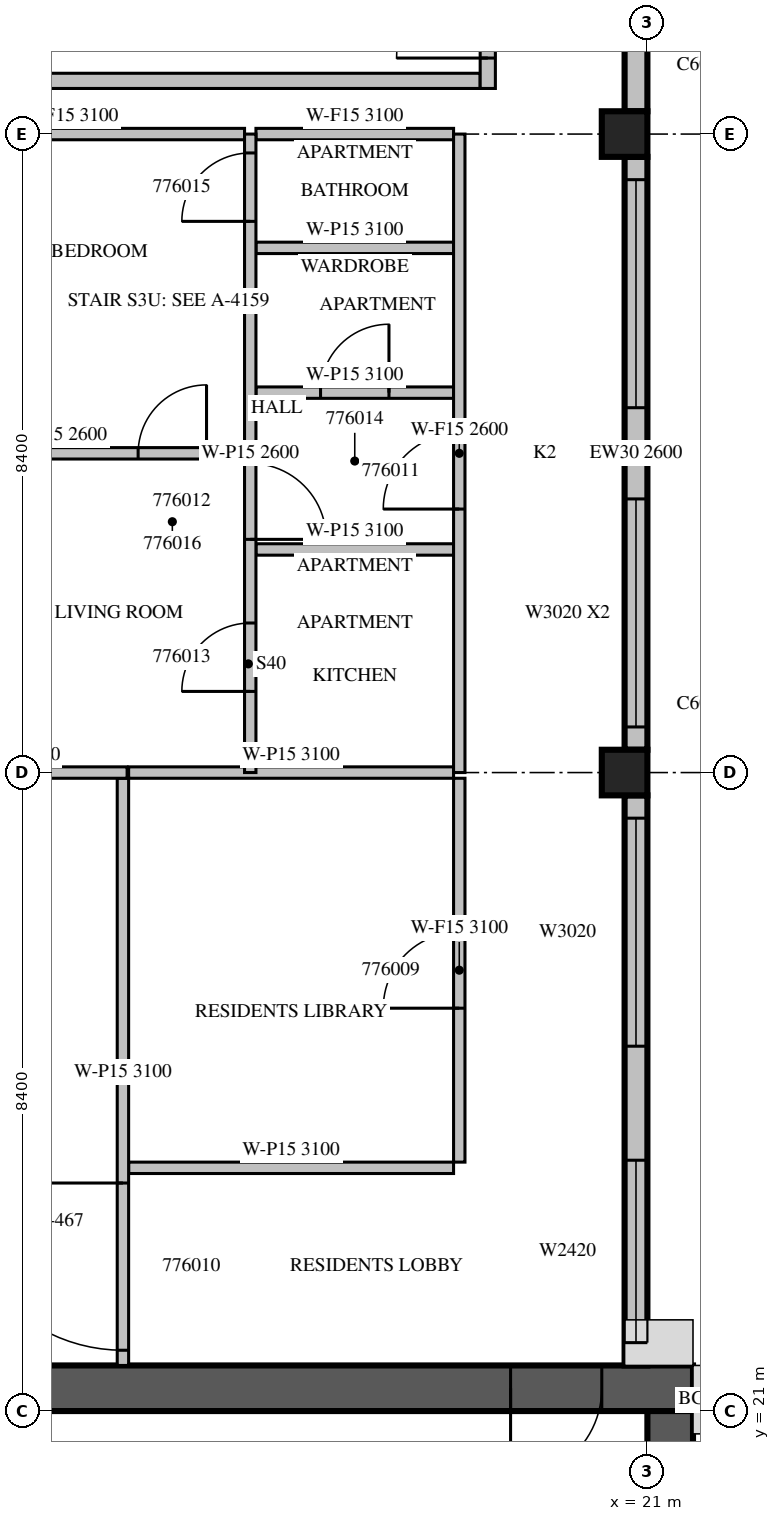
"""IFC4 building model, lengths in metres.
Left out: names, types, materials, properties, quantities, classifications, styles, units other than length and angle.
Written with IfcOpenShell. Run it as: python <this file> out.ifc"""

import sys

from ifc_helpers import new_model, si_unit, direction, frame, frame_2d, origin, origin_2d, place, context, subcontext, project, spatial, rectangle, extrude, source, transform, mapped, element, fill, save


model = new_model("IFC4")
c1 = context("Model", 3, precision=1e-05, world=origin(), true_north=direction((0.0, 1.0)))
c2 = subcontext(c1, "Body", "Model", "MODEL_VIEW")
j1 = project(units=[si_unit("LENGTHUNIT", "METRE"), si_unit("PLANEANGLEUNIT", "RADIAN")], contexts=[c1])
p1 = place(None, origin())
s1 = spatial("IfcSite", under=j1, at=p1, CompositionType="ELEMENT")
p2 = place(p1, origin())
s2 = spatial("IfcBuilding", under=s1, at=p2, CompositionType="ELEMENT")
p3 = place(p2, frame((0.0, 0.0, 326.5)))
s3 = spatial("IfcBuildingStorey", under=s2, at=p3, CompositionType="ELEMENT", Elevation=326.5)
m1 = source(origin(), c2, "Body", "SweptSolid", [
    extrude(rectangle(XDim=0.6, YDim=0.6, at=origin_2d()), origin(), (0.0, 0.0, 1.0), 3.5),
])
for number, where, z_axis, x_axis in (
    (1, (20.7, 29.4, 0.0), (0.0, 0.0, 1.0), (1.0, 0.0, 0.0)),
    (2, (20.7, 37.8, 0.0), (0.0, 0.0, 1.0), (1.0, 0.0, 0.0)),
):
    element("IfcColumn", number, at=place(p3, frame(where, z_axis=z_axis, x_axis=x_axis)), inside=s3, PredefinedType="COLUMN", context=c2, shape_type="MappedRepresentation", body=[
        mapped(m1, transform((0.0, 0.0, 0.0), scale=1.0)),
    ])
m2 = source(origin(), c2, "Body", "SweptSolid", [
    extrude(rectangle(XDim=11.1, YDim=0.6, at=frame_2d((5.55, 0.0))), origin(), (0.0, 0.0, 1.0), 3.5),
])
p4 = place(p3, frame((10.5, 21.3, 0.0), z_axis=(0.0, 0.0, 1.0), x_axis=(1.0, 0.0, 0.0)))
e3 = element("IfcWall", 3, at=p4, inside=s3, PredefinedType="SHEAR", context=c2, shape_type="MappedRepresentation", body=[
    mapped(m2, transform((0.0, 0.0, 0.0), scale=1.0)),
])
m3 = source(origin(), c2, "Body", "SweptSolid", [
    extrude(rectangle(XDim=1.2, YDim=2.1, at=frame_2d((0.6, 1.05))), frame((0.0, 0.31, 0.0), z_axis=(0.0, -1.0, 0.0), x_axis=(1.0, 0.0, 0.0)), (0.0, 0.0, 1.0), 0.62),
])
p5 = place(p4, frame((8.7, 0.0, 0.0)))
e4 = element("IfcOpeningElement", 4, at=p5, cuts=e3, PredefinedType="OPENING", context=c2, shape_type="MappedRepresentation", body=[
    mapped(m3, transform((0.0, 0.0, 0.0), scale=1.0)),
])
m4 = source(origin(), c2, "Body", "SweptSolid", [
    extrude(rectangle(XDim=10.5, YDim=0.6, at=frame_2d((5.25, 0.0))), origin(), (0.0, 0.0, 1.0), 3.5),
])
p6 = place(p3, frame((21.3, 10.5, 0.0), z_axis=(0.0, 0.0, 1.0), x_axis=(0.0, 1.0, 0.0)))
e5 = element("IfcWall", 5, at=p6, inside=s3, PredefinedType="SHEAR", context=c2, shape_type="MappedRepresentation", body=[
    mapped(m4, transform((0.0, 0.0, 0.0), scale=1.0)),
])
m5 = source(origin(), c2, "Body", "SweptSolid", [
    extrude(rectangle(XDim=1.2, YDim=2.4, at=frame_2d((0.6, 1.2))), frame((0.0, 0.31, 0.0), z_axis=(0.0, -1.0, 0.0), x_axis=(1.0, 0.0, 0.0)), (0.0, 0.0, 1.0), 0.62),
])
p7 = place(p6, frame((5.7, 0.0, 0.6)))
e6 = element("IfcOpeningElement", 6, at=p7, cuts=e5, PredefinedType="OPENING", context=c2, shape_type="MappedRepresentation", body=[
    mapped(m5, transform((0.0, 0.0, 0.0), scale=1.0)),
])
m6 = source(origin(), c2, "Body", "SweptSolid", [
    extrude(rectangle(XDim=7.5, YDim=0.3, at=frame_2d((3.75, 0.0))), origin(), (0.0, 0.0, 1.0), 3.1),
])
p8 = place(p3, frame((20.85, 21.6, 0.0), z_axis=(0.0, 0.0, 1.0), x_axis=(0.0, 1.0, 0.0)))
e7 = element("IfcWall", 7, at=p8, inside=s3, PredefinedType="STANDARD", context=c2, shape_type="MappedRepresentation", body=[
    mapped(m6, transform((0.0, 0.0, 0.0), scale=1.0)),
])
m7 = source(origin(), c2, "Body", "SweptSolid", [
    extrude(rectangle(XDim=2.4, YDim=2.0, at=frame_2d((1.2, 1.0))), frame((0.0, 0.16, 0.0), z_axis=(0.0, -1.0, 0.0), x_axis=(1.0, 0.0, 0.0)), (0.0, 0.0, 1.0), 0.32),
])
p9 = place(p8, frame((0.3, 0.0, 0.6)))
e8 = element("IfcOpeningElement", 8, at=p9, cuts=e7, PredefinedType="OPENING", context=c2, shape_type="MappedRepresentation", body=[
    mapped(m7, transform((0.0, 0.0, 0.0), scale=1.0)),
])
m8 = source(origin(), c2, "Body", "SweptSolid", [
    extrude(rectangle(XDim=3.0, YDim=2.0, at=frame_2d((1.5, 1.0))), frame((0.0, 0.16, 0.0), z_axis=(0.0, -1.0, 0.0), x_axis=(1.0, 0.0, 0.0)), (0.0, 0.0, 1.0), 0.32),
])
p10 = place(p8, frame((4.2, 0.0, 0.6)))
e9 = element("IfcOpeningElement", 9, at=p10, cuts=e7, PredefinedType="OPENING", context=c2, shape_type="MappedRepresentation", body=[
    mapped(m8, transform((0.0, 0.0, 0.0), scale=1.0)),
])
p11 = place(p3, frame((20.85, 29.7, 0.0), z_axis=(0.0, 0.0, 1.0), x_axis=(0.0, 1.0, 0.0)))
e10 = element("IfcWall", 10, at=p11, inside=s3, PredefinedType="STANDARD", context=c2, shape_type="SweptSolid", body=[
    extrude(rectangle(XDim=7.8, YDim=0.3, at=frame_2d((3.9, 0.0))), origin(), (0.0, 0.0, 1.0), 2.6),
])
p12 = place(p11, frame((0.3, 0.0, 0.6)))
e11 = element("IfcOpeningElement", 11, at=p12, cuts=e10, PredefinedType="OPENING", context=c2, shape_type="MappedRepresentation", body=[
    mapped(m8, transform((0.0, 0.0, 0.0), scale=1.0)),
])
p13 = place(p11, frame((4.5, 0.0, 0.6)))
e12 = element("IfcOpeningElement", 12, at=p13, cuts=e10, PredefinedType="OPENING", context=c2, shape_type="MappedRepresentation", body=[
    mapped(m8, transform((0.0, 0.0, 0.0), scale=1.0)),
])
p14 = place(p3, frame((20.85, 38.1, 0.0), z_axis=(0.0, 0.0, 1.0), x_axis=(0.0, 1.0, 0.0)))
e13 = element("IfcWall", 13, at=p14, inside=s3, PredefinedType="STANDARD", context=c2, shape_type="SweptSolid", body=[
    extrude(rectangle(XDim=5.58, YDim=0.3, at=frame_2d((2.79, 0.0))), origin(), (0.0, 0.0, 1.0), 3.1),
])
m9 = source(origin(), c2, "Body", "SweptSolid", [
    extrude(rectangle(XDim=3.6, YDim=2.0, at=frame_2d((1.8, 1.0))), frame((0.0, 0.16, 0.0), z_axis=(0.0, -1.0, 0.0), x_axis=(1.0, 0.0, 0.0)), (0.0, 0.0, 1.0), 0.32),
])
p15 = place(p14, frame((0.84, 0.0, 0.6)))
e14 = element("IfcOpeningElement", 14, at=p15, cuts=e13, PredefinedType="OPENING", context=c2, shape_type="MappedRepresentation", body=[
    mapped(m9, transform((0.0, 0.0, 0.0), scale=1.0)),
])
m10 = source(origin(), c2, "Body", "SweptSolid", [
    extrude(rectangle(XDim=8.0, YDim=0.2, at=frame_2d((4.0, 0.0))), origin(), (0.0, 0.0, 1.0), 3.1),
])
p16 = place(p3, frame((10.8, 38.5, 0.0), z_axis=(0.0, 0.0, 1.0), x_axis=(1.0, 0.0, 0.0)))
e15 = element("IfcWall", 15, at=p16, inside=s3, PredefinedType="PARTITIONING", context=c2, shape_type="MappedRepresentation", body=[
    mapped(m10, transform((0.0, 0.0, 0.0), scale=1.0)),
])
m11 = source(origin(), c2, "Body", "SweptSolid", [
    extrude(rectangle(XDim=5.45, YDim=0.2, at=frame_2d((2.725, 0.0))), origin(), (0.0, 0.0, 1.0), 3.1),
])
p17 = place(p3, frame((18.9, 38.4, 0.0), z_axis=(0.0, 0.0, 1.0), x_axis=(0.0, 1.0, 0.0)))
e16 = element("IfcWall", 16, at=p17, inside=s3, PredefinedType="PARTITIONING", context=c2, shape_type="MappedRepresentation", body=[
    mapped(m11, transform((0.0, 0.0, 0.0), scale=1.0)),
])
m12 = source(origin(), c2, "Body", "SweptSolid", [
    extrude(rectangle(XDim=1.2, YDim=2.1, at=frame_2d((0.6, 1.05))), frame((0.0, 0.11, 0.0), z_axis=(0.0, -1.0, 0.0), x_axis=(1.0, 0.0, 0.0)), (0.0, 0.0, 1.0), 0.22),
])
p18 = place(p17, frame((0.4, 0.0, 0.0)))
e17 = element("IfcOpeningElement", 17, at=p18, cuts=e16, PredefinedType="OPENING", context=c2, shape_type="MappedRepresentation", body=[
    mapped(m12, transform((0.0, 0.0, 0.0), scale=1.0)),
])
m13 = source(origin(), c2, "Body", "SweptSolid", [
    extrude(rectangle(XDim=0.9, YDim=2.1, at=frame_2d((0.45, 1.05))), frame((0.0, 0.11, 0.0), z_axis=(0.0, -1.0, 0.0), x_axis=(1.0, 0.0, 0.0)), (0.0, 0.0, 1.0), 0.22),
])
p19 = place(p17, frame((3.25, 0.0, 0.0)))
e18 = element("IfcOpeningElement", 18, at=p19, cuts=e16, PredefinedType="OPENING", context=c2, shape_type="MappedRepresentation", body=[
    mapped(m13, transform((0.0, 0.0, 0.0), scale=1.0)),
])
m14 = source(origin(), c2, "Body", "SweptSolid", [
    extrude(rectangle(XDim=4.275, YDim=0.15, at=frame_2d((2.138, 0.0))), origin(), (0.0, 0.0, 1.0), 3.1),
])
for number, where, z_axis, x_axis in (
    (19, (14.175, 24.2, 0.0), (0.0, 0.0, 1.0), (1.0, 0.0, 0.0)),
    (20, (18.45, 29.4, 0.0), (0.0, 0.0, 1.0), (-1.0, 0.0, 0.0)),
):
    element("IfcWall", number, at=place(p3, frame(where, z_axis=z_axis, x_axis=x_axis)), inside=s3, PredefinedType="PARTITIONING", context=c2, shape_type="MappedRepresentation", body=[
        mapped(m14, transform((0.0, 0.0, 0.0), scale=1.0)),
    ])
m15 = source(origin(), c2, "Body", "SweptSolid", [
    extrude(rectangle(XDim=5.05, YDim=0.15, at=frame_2d((2.525, 0.0))), origin(), (0.0, 0.0, 1.0), 3.1),
])
p20 = place(p3, frame((18.525, 24.275, 0.0), z_axis=(0.0, 0.0, 1.0), x_axis=(0.0, 1.0, 0.0)))
e21 = element("IfcWall", 21, at=p20, inside=s3, PredefinedType="PARTITIONING", context=c2, shape_type="MappedRepresentation", body=[
    mapped(m15, transform((0.0, 0.0, 0.0), scale=1.0)),
])
m16 = source(origin(), c2, "Body", "SweptSolid", [
    extrude(rectangle(XDim=1.0, YDim=2.1, at=frame_2d((0.5, 1.05))), frame((0.0, 0.085, 0.0), z_axis=(0.0, -1.0, 0.0), x_axis=(1.0, 0.0, 0.0)), (0.0, 0.0, 1.0), 0.17),
])
p21 = place(p20, frame((2.025, 0.0, 0.0)))
e22 = element("IfcOpeningElement", 22, at=p21, cuts=e21, PredefinedType="OPENING", context=c2, shape_type="MappedRepresentation", body=[
    mapped(m16, transform((0.0, 0.0, 0.0), scale=1.0)),
])
m17 = source(origin(), c2, "Body", "SweptSolid", [
    extrude(rectangle(XDim=7.725, YDim=0.15, at=frame_2d((3.862, 0.0))), origin(), (0.0, 0.0, 1.0), 3.1),
])
p22 = place(p3, frame((14.1, 29.325, 0.0), z_axis=(0.0, 0.0, 1.0), x_axis=(0.0, -1.0, 0.0)))
e23 = element("IfcWall", 23, at=p22, inside=s3, PredefinedType="PARTITIONING", context=c2, shape_type="MappedRepresentation", body=[
    mapped(m17, transform((0.0, 0.0, 0.0), scale=1.0)),
])
m18 = source(origin(), c2, "Body", "SweptSolid", [
    extrude(rectangle(XDim=2.2, YDim=2.1, at=frame_2d((1.1, 1.05))), frame((0.0, 0.085, 0.0), z_axis=(0.0, -1.0, 0.0), x_axis=(1.0, 0.0, 0.0)), (0.0, 0.0, 1.0), 0.17),
])
p23 = place(p22, frame((5.325, 0.0, 0.0)))
e24 = element("IfcOpeningElement", 24, at=p23, cuts=e23, PredefinedType="OPENING", context=c2, shape_type="MappedRepresentation", body=[
    mapped(m18, transform((0.0, 0.0, 0.0), scale=1.0)),
])
p24 = place(p3, frame((15.7, 33.6, 0.0), z_axis=(0.0, 0.0, 1.0), x_axis=(-1.0, 0.0, 0.0)))
e25 = element("IfcWall", 25, at=p24, inside=s3, PredefinedType="PARTITIONING", context=c2, shape_type="SweptSolid", body=[
    extrude(rectangle(XDim=4.9, YDim=0.15, at=frame_2d((2.45, 0.0))), origin(), (0.0, 0.0, 1.0), 2.6),
])
m19 = source(origin(), c2, "Body", "SweptSolid", [
    extrude(rectangle(XDim=0.9, YDim=2.1, at=frame_2d((0.45, 1.05))), frame((0.0, 0.085, 0.0), z_axis=(0.0, -1.0, 0.0), x_axis=(1.0, 0.0, 0.0)), (0.0, 0.0, 1.0), 0.17),
])
p25 = place(p24, frame((0.5, 0.0, 0.0)))
e26 = element("IfcOpeningElement", 26, at=p25, cuts=e25, PredefinedType="OPENING", context=c2, shape_type="MappedRepresentation", body=[
    mapped(m19, transform((0.0, 0.0, 0.0), scale=1.0)),
])
m20 = source(origin(), c2, "Body", "SweptSolid", [
    extrude(rectangle(XDim=2.6, YDim=0.15, at=frame_2d((1.3, 0.0))), origin(), (0.0, 0.0, 1.0), 3.1),
])
p26 = place(p3, frame((18.45, 32.335, 0.0), z_axis=(0.0, 0.0, 1.0), x_axis=(-1.0, 0.0, 0.0)))
e27 = element("IfcWall", 27, at=p26, inside=s3, PredefinedType="PARTITIONING", context=c2, shape_type="MappedRepresentation", body=[
    mapped(m20, transform((0.0, 0.0, 0.0), scale=1.0)),
])
p27 = place(p3, frame((18.45, 34.398, 0.0), z_axis=(0.0, 0.0, 1.0), x_axis=(-1.0, 0.0, 0.0)))
e28 = element("IfcWall", 28, at=p27, inside=s3, PredefinedType="PARTITIONING", context=c2, shape_type="MappedRepresentation", body=[
    mapped(m20, transform((0.0, 0.0, 0.0), scale=1.0)),
])
p28 = place(p27, frame((0.85, 0.0, 0.0)))
e29 = element("IfcOpeningElement", 29, at=p28, cuts=e28, PredefinedType="OPENING", context=c2, shape_type="MappedRepresentation", body=[
    mapped(m19, transform((0.0, 0.0, 0.0), scale=1.0)),
])
p29 = place(p3, frame((18.45, 36.303, 0.0), z_axis=(0.0, 0.0, 1.0), x_axis=(-1.0, 0.0, 0.0)))
e30 = element("IfcWall", 30, at=p29, inside=s3, PredefinedType="PARTITIONING", context=c2, shape_type="MappedRepresentation", body=[
    mapped(m20, transform((0.0, 0.0, 0.0), scale=1.0)),
])
m21 = source(origin(), c2, "Body", "SweptSolid", [
    extrude(rectangle(XDim=3.056, YDim=0.15, at=frame_2d((1.528, 0.0))), origin(), (0.0, 0.0, 1.0), 3.1),
])
p30 = place(p3, frame((14.155, 29.4, 0.0), z_axis=(0.0, 0.0, 1.0), x_axis=(-1.0, 0.0, 0.0)))
e31 = element("IfcWall", 31, at=p30, inside=s3, PredefinedType="PARTITIONING", context=c2, shape_type="MappedRepresentation", body=[
    mapped(m21, transform((0.0, 0.0, 0.0), scale=1.0)),
])
m22 = source(origin(), c2, "Body", "SweptSolid", [
    extrude(rectangle(XDim=4.601, YDim=0.15, at=frame_2d((2.3, 0.0))), origin(), (0.0, 0.0, 1.0), 3.1),
])
p31 = place(p3, frame((15.7, 37.8, 0.0), z_axis=(0.0, 0.0, 1.0), x_axis=(-1.0, 0.0, 0.0)))
e32 = element("IfcWall", 32, at=p31, inside=s3, PredefinedType="PARTITIONING", context=c2, shape_type="MappedRepresentation", body=[
    mapped(m22, transform((0.0, 0.0, 0.0), scale=1.0)),
])
p32 = place(p3, frame((18.45, 37.8, 0.0), z_axis=(0.0, 0.0, 1.0), x_axis=(-1.0, 0.0, 0.0)))
e33 = element("IfcWall", 33, at=p32, inside=s3, PredefinedType="PARTITIONING", context=c2, shape_type="MappedRepresentation", body=[
    mapped(m20, transform((0.0, 0.0, 0.0), scale=1.0)),
])
m23 = source(origin(), c2, "Body", "SweptSolid", [
    extrude(rectangle(XDim=8.4, YDim=0.15, at=frame_2d((4.2, 0.0))), origin(), (0.0, 0.0, 1.0), 2.6),
])
p33 = place(p3, frame((15.775, 29.4, 0.0), z_axis=(0.0, 0.0, 1.0), x_axis=(0.0, 1.0, 0.0)))
e34 = element("IfcWall", 34, at=p33, inside=s3, PredefinedType="PARTITIONING", context=c2, shape_type="MappedRepresentation", body=[
    mapped(m23, transform((0.0, 0.0, 0.0), scale=1.0)),
])
p34 = place(p33, frame((3.068, 0.0, 0.0)))
e35 = element("IfcOpeningElement", 35, at=p34, cuts=e34, PredefinedType="OPENING", context=c2, shape_type="MappedRepresentation", body=[
    mapped(m16, transform((0.0, 0.0, 0.0), scale=1.0)),
])
p35 = place(p33, frame((1.067, 0.0, 0.0)))
e36 = element("IfcOpeningElement", 36, at=p35, cuts=e34, PredefinedType="OPENING", context=c2, shape_type="MappedRepresentation", body=[
    mapped(m19, transform((0.0, 0.0, 0.0), scale=1.0)),
])
p36 = place(p33, frame((7.252, 0.0, 0.0)))
e37 = element("IfcOpeningElement", 37, at=p36, cuts=e34, PredefinedType="OPENING", context=c2, shape_type="MappedRepresentation", body=[
    mapped(m19, transform((0.0, 0.0, 0.0), scale=1.0)),
])
p37 = place(p3, frame((18.525, 29.4, 0.0), z_axis=(0.0, 0.0, 1.0), x_axis=(0.0, 1.0, 0.0)))
e38 = element("IfcWall", 38, at=p37, inside=s3, PredefinedType="PARTITIONING", context=c2, shape_type="MappedRepresentation", body=[
    mapped(m23, transform((0.0, 0.0, 0.0), scale=1.0)),
])
p38 = place(p37, frame((3.467, 0.0, 0.0)))
e39 = element("IfcOpeningElement", 39, at=p38, cuts=e38, PredefinedType="OPENING", context=c2, shape_type="MappedRepresentation", body=[
    mapped(m16, transform((0.0, 0.0, 0.0), scale=1.0)),
])
m24 = source(origin(), c2, "Body", "SweptSolid", [
    extrude(rectangle(XDim=2.4, YDim=2.0, at=frame_2d((1.2, 1.0))), frame((0.0, 0.03, 0.0), z_axis=(0.0, -1.0, 0.0), x_axis=(1.0, 0.0, 0.0)), (0.0, 0.0, 1.0), 0.06),
])
p39 = place(p9, origin())
e40 = element("IfcWindow", 40, at=p39, inside=s3, PartitioningType="SINGLE_PANEL", PredefinedType="WINDOW", context=c2, shape_type="MappedRepresentation", body=[
    mapped(m24, transform((0.0, 0.0, 0.0), scale=1.0)),
])
fill(e8, e40)
m25 = source(origin(), c2, "Body", "SweptSolid", [
    extrude(rectangle(XDim=3.0, YDim=2.0, at=frame_2d((1.5, 1.0))), frame((0.0, 0.03, 0.0), z_axis=(0.0, -1.0, 0.0), x_axis=(1.0, 0.0, 0.0)), (0.0, 0.0, 1.0), 0.06),
])
p40 = place(p10, origin())
e41 = element("IfcWindow", 41, at=p40, inside=s3, PartitioningType="SINGLE_PANEL", PredefinedType="WINDOW", context=c2, shape_type="MappedRepresentation", body=[
    mapped(m25, transform((0.0, 0.0, 0.0), scale=1.0)),
])
fill(e9, e41)
p41 = place(p12, origin())
e42 = element("IfcWindow", 42, at=p41, inside=s3, PartitioningType="SINGLE_PANEL", PredefinedType="WINDOW", context=c2, shape_type="MappedRepresentation", body=[
    mapped(m25, transform((0.0, 0.0, 0.0), scale=1.0)),
])
fill(e11, e42)
p42 = place(p13, origin())
e43 = element("IfcWindow", 43, at=p42, inside=s3, PartitioningType="SINGLE_PANEL", PredefinedType="WINDOW", context=c2, shape_type="MappedRepresentation", body=[
    mapped(m25, transform((0.0, 0.0, 0.0), scale=1.0)),
])
fill(e12, e43)
m26 = source(origin(), c2, "Body", "SweptSolid", [
    extrude(rectangle(XDim=1.2, YDim=2.1, at=frame_2d((0.6, 1.05))), frame((0.0, 0.025, 0.0), z_axis=(0.0, -1.0, 0.0), x_axis=(1.0, 0.0, 0.0)), (0.0, 0.0, 1.0), 0.05),
])
p43 = place(p18, origin())
e44 = element("IfcDoor", 44, at=p43, inside=s3, OperationType="SINGLE_SWING_LEFT", PredefinedType="DOOR", context=c2, shape_type="MappedRepresentation", body=[
    mapped(m26, transform((0.0, 0.0, 0.0), scale=1.0)),
])
fill(e17, e44)
p44 = place(p5, origin())
e45 = element("IfcDoor", 45, at=p44, inside=s3, OperationType="SINGLE_SWING_RIGHT", PredefinedType="DOOR", context=c2, shape_type="MappedRepresentation", body=[
    mapped(m26, transform((0.0, 0.0, 0.0), scale=1.0)),
])
fill(e4, e45)
m27 = source(origin(), c2, "Body", "SweptSolid", [
    extrude(rectangle(XDim=1.0, YDim=2.1, at=frame_2d((0.5, 1.05))), frame((0.0, 0.025, 0.0), z_axis=(0.0, -1.0, 0.0), x_axis=(1.0, 0.0, 0.0)), (0.0, 0.0, 1.0), 0.05),
])
p45 = place(p21, origin())
e46 = element("IfcDoor", 46, at=p45, inside=s3, OperationType="SINGLE_SWING_LEFT", PredefinedType="DOOR", context=c2, shape_type="MappedRepresentation", body=[
    mapped(m27, transform((0.0, 0.0, 0.0), scale=1.0)),
])
fill(e22, e46)
m28 = source(origin(), c2, "Body", "SweptSolid", [
    extrude(rectangle(XDim=2.2, YDim=2.1, at=frame_2d((1.1, 1.05))), frame((0.0, 0.025, 0.0), z_axis=(0.0, -1.0, 0.0), x_axis=(1.0, 0.0, 0.0)), (0.0, 0.0, 1.0), 0.05),
])
p46 = place(p23, origin())
e47 = element("IfcDoor", 47, at=p46, inside=s3, OperationType="DOUBLE_DOOR_SINGLE_SWING", PredefinedType="DOOR", context=c2, shape_type="MappedRepresentation", body=[
    mapped(m28, transform((0.0, 0.0, 0.0), scale=1.0)),
])
fill(e24, e47)
p47 = place(p38, origin())
e48 = element("IfcDoor", 48, at=p47, inside=s3, OperationType="SINGLE_SWING_LEFT", PredefinedType="DOOR", context=c2, shape_type="MappedRepresentation", body=[
    mapped(m27, transform((0.0, 0.0, 0.0), scale=1.0)),
])
fill(e39, e48)
p48 = place(p34, origin())
e49 = element("IfcDoor", 49, at=p48, inside=s3, OperationType="SINGLE_SWING_RIGHT", PredefinedType="DOOR", context=c2, shape_type="MappedRepresentation", body=[
    mapped(m27, transform((0.0, 0.0, 0.0), scale=1.0)),
])
fill(e35, e49)
m29 = source(origin(), c2, "Body", "SweptSolid", [
    extrude(rectangle(XDim=0.9, YDim=2.1, at=frame_2d((0.45, 1.05))), frame((0.0, 0.025, 0.0), z_axis=(0.0, -1.0, 0.0), x_axis=(1.0, 0.0, 0.0)), (0.0, 0.0, 1.0), 0.05),
])
p49 = place(p35, origin())
e50 = element("IfcDoor", 50, at=p49, inside=s3, OperationType="SINGLE_SWING_LEFT", PredefinedType="DOOR", context=c2, shape_type="MappedRepresentation", body=[
    mapped(m29, transform((0.0, 0.0, 0.0), scale=1.0)),
])
fill(e36, e50)
p50 = place(p28, origin())
e51 = element("IfcDoor", 51, at=p50, inside=s3, OperationType="SINGLE_SWING_RIGHT", PredefinedType="DOOR", context=c2, shape_type="MappedRepresentation", body=[
    mapped(m29, transform((0.0, 0.0, 0.0), scale=1.0)),
])
fill(e29, e51)
p51 = place(p36, origin())
e52 = element("IfcDoor", 52, at=p51, inside=s3, OperationType="SINGLE_SWING_LEFT", PredefinedType="DOOR", context=c2, shape_type="MappedRepresentation", body=[
    mapped(m29, transform((0.0, 0.0, 0.0), scale=1.0)),
])
fill(e37, e52)
p52 = place(p25, origin())
e53 = element("IfcDoor", 53, at=p52, inside=s3, OperationType="SINGLE_SWING_RIGHT", PredefinedType="DOOR", context=c2, shape_type="MappedRepresentation", body=[
    mapped(m29, transform((0.0, 0.0, 0.0), scale=1.0)),
])
fill(e26, e53)
save(model, sys.argv[1])
